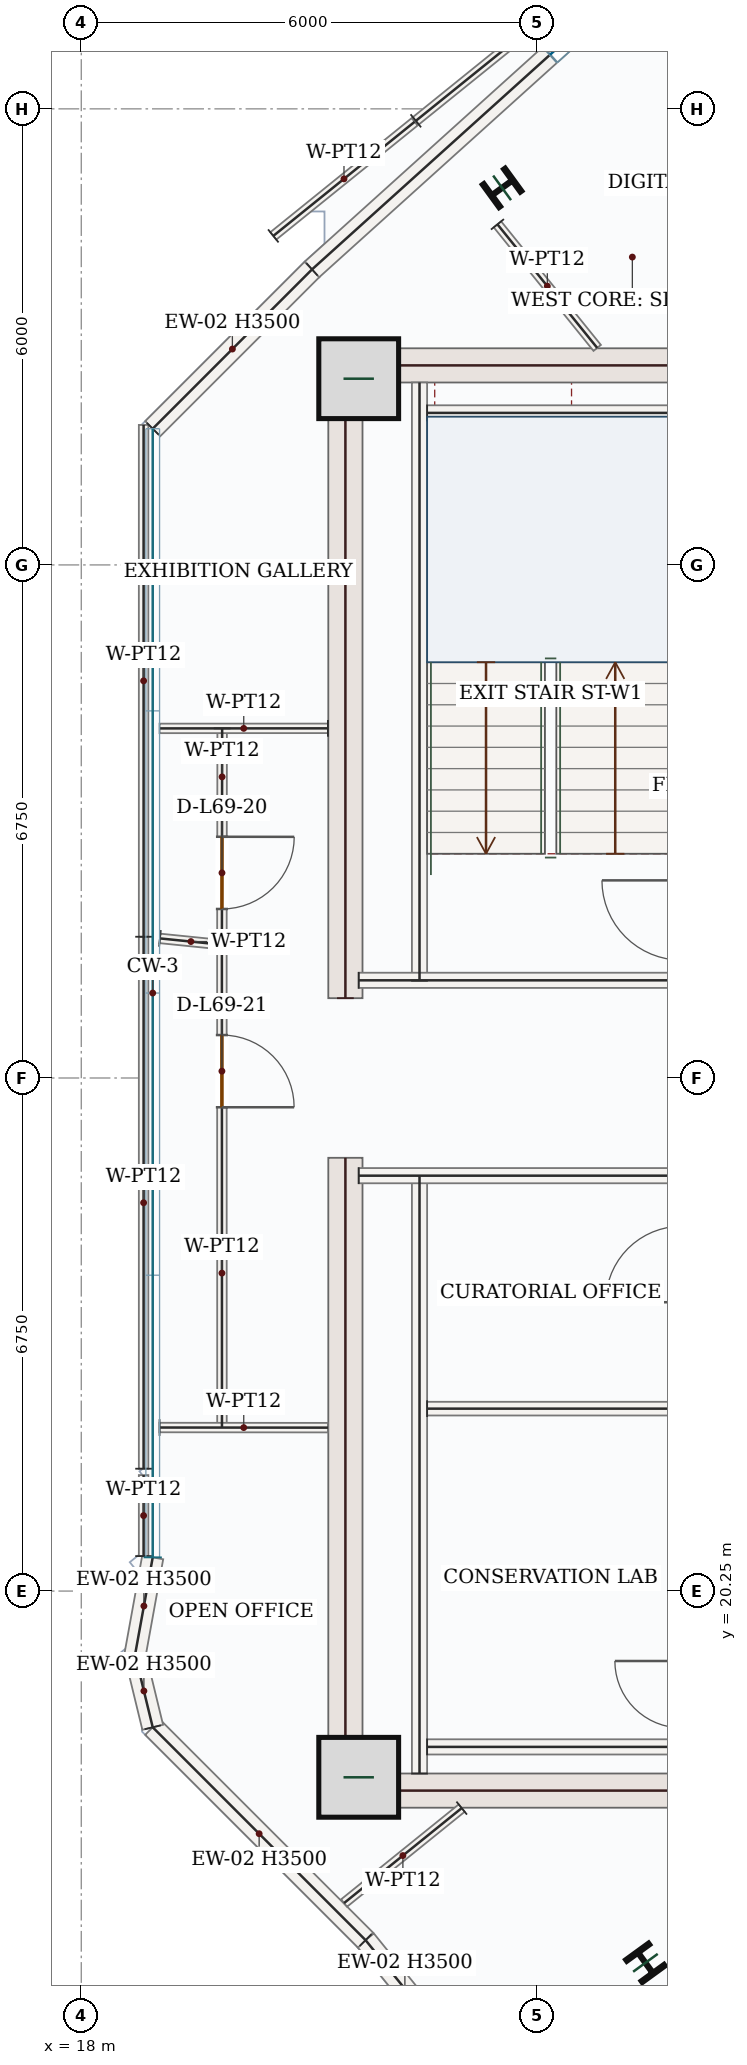
"""IFC4 building model, lengths in metres.
Left out: names, types, materials, properties, quantities, classifications, styles, units other than length and angle.
Written with IfcOpenShell. Run it as: python <this file> out.ifc"""

import sys

from ifc_helpers import new_model, si_unit, direction, frame, frame_2d, origin, origin_2d, place, context, subcontext, project, spatial, rectangle, i_section, extrude, source, transform, mapped, element, fill, save


model = new_model("IFC4")
c1 = context("Model", 3, precision=1e-05, world=origin(), true_north=direction((0.0, 1.0)))
c2 = subcontext(c1, "Body", "Model", "MODEL_VIEW")
j1 = project(units=[si_unit("LENGTHUNIT", "METRE"), si_unit("PLANEANGLEUNIT", "RADIAN")], contexts=[c1])
p1 = place(None, origin())
s1 = spatial("IfcSite", under=j1, at=p1, CompositionType="ELEMENT")
p2 = place(p1, origin())
s2 = spatial("IfcBuilding", under=s1, at=p2, CompositionType="ELEMENT")
p3 = place(p2, frame((0.0, 0.0, 287.85)))
s3 = spatial("IfcBuildingStorey", under=s2, at=p3, CompositionType="ELEMENT", Elevation=287.85)
m1 = source(origin(), c2, "Body", "SweptSolid", [
    extrude(rectangle(XDim=8.55, YDim=0.45, at=frame_2d((4.275, 0.0))), origin(), (0.0, 0.0, 1.0), 3.5),
])
for number, where, z_axis, x_axis in (
    (1, (21.475, 17.4, 0.0), (0.0, 0.0, 1.0), (0.0, 1.0, 0.0)),
    (2, (21.475, 28.05, 0.0), (0.0, 0.0, 1.0), (0.0, 1.0, 0.0)),
):
    element("IfcWall", number, at=place(p3, frame(where, z_axis=z_axis, x_axis=x_axis)), inside=s3, PredefinedType="SHEAR", context=c2, shape_type="MappedRepresentation", body=[
        mapped(m1, transform((0.0, 0.0, 0.0), x_axis=(1.0, 0.0, 0.0), y_axis=(0.0, 1.0, 0.0), z_axis=(0.0, 0.0, 1.0), scale=1.0)),
    ])
m2 = source(origin(), c2, "Body", "SweptSolid", [
    extrude(rectangle(XDim=7.1, YDim=0.45, at=frame_2d((3.55, 0.0))), origin(), (0.0, 0.0, 1.0), 3.5),
])
for number, where, z_axis, x_axis in (
    (3, (21.7, 17.625, 0.0), (0.0, 0.0, 1.0), (1.0, 0.0, 0.0)),
    (4, (21.7, 36.375, 0.0), (0.0, 0.0, 1.0), (1.0, 0.0, 0.0)),
):
    element("IfcWall", number, at=place(p3, frame(where, z_axis=z_axis, x_axis=x_axis)), inside=s3, PredefinedType="SHEAR", context=c2, shape_type="MappedRepresentation", body=[
        mapped(m2, transform((0.0, 0.0, 0.0), x_axis=(1.0, 0.0, 0.0), y_axis=(0.0, 1.0, 0.0), z_axis=(0.0, 0.0, 1.0), scale=1.0)),
    ])
m3 = source(origin(), c2, "Body", "SweptSolid", [
    extrude(rectangle(XDim=1.05, YDim=1.05, at=origin_2d()), origin(), (0.0, 0.0, 1.0), 3.75),
])
for number, where, z_axis, x_axis in (
    (5, (21.65, 17.8, 0.0), (0.0, 0.0, 1.0), (1.0, 0.0, 0.0)),
    (6, (21.65, 36.2, 0.0), (0.0, 0.0, 1.0), (1.0, 0.0, 0.0)),
):
    element("IfcColumn", number, at=place(p3, frame(where, z_axis=z_axis, x_axis=x_axis)), inside=s3, PredefinedType="COLUMN", context=c2, shape_type="MappedRepresentation", body=[
        mapped(m3, transform((0.0, 0.0, 0.0), x_axis=(1.0, 0.0, 0.0), y_axis=(0.0, 1.0, 0.0), z_axis=(0.0, 0.0, 1.0), scale=1.0)),
    ])
m4 = source(origin(), c2, "Body", "SweptSolid", [
    extrude(i_section(OverallWidth=0.374, OverallDepth=0.372, WebThickness=0.016, FlangeThickness=0.026, FilletRadius=0.018, at=origin_2d()), origin(), (0.0, 0.0, 1.0), 3.75),
])
for number, where, z_axis, x_axis in (
    (7, (23.536, 38.711, 0.0), (0.0, 0.0, 1.0), (-0.588, 0.809, 0.0)),
    (8, (25.422, 15.359, 0.0), (0.0, 0.0, 1.0), (0.809, 0.588, 0.0)),
):
    element("IfcColumn", number, at=place(p3, frame(where, z_axis=z_axis, x_axis=x_axis)), inside=s3, PredefinedType="COLUMN", context=c2, shape_type="MappedRepresentation", body=[
        mapped(m4, transform((0.0, 0.0, 0.0), x_axis=(1.0, 0.0, 0.0), y_axis=(0.0, 1.0, 0.0), z_axis=(0.0, 0.0, 1.0), scale=1.0)),
    ])
m5 = source(origin(), c2, "Body", "SweptSolid", [
    extrude(rectangle(XDim=2.964, YDim=0.28, at=frame_2d((1.482, 0.0))), origin(), (0.0, 0.0, 1.0), 3.5),
])
p4 = place(p3, frame((18.94, 35.542, 0.0), z_axis=(0.0, 0.0, 1.0), x_axis=(0.707106781187, 0.707106781187, 0.0)))
e9 = element("IfcWall", 9, at=p4, inside=s3, PredefinedType="SOLIDWALL", context=c2, shape_type="MappedRepresentation", body=[
    mapped(m5, transform((0.0, 0.0, 0.0), x_axis=(1.0, 0.0, 0.0), y_axis=(0.0, 1.0, 0.0), z_axis=(0.0, 0.0, 1.0), scale=1.0)),
])
p5 = place(p3, frame((21.036, 37.638, 0.0), z_axis=(0.0, 0.0, 1.0), x_axis=(0.742587457262, 0.669749108486, 0.0)))
e10 = element("IfcWall", 10, at=p5, inside=s3, PredefinedType="SOLIDWALL", context=c2, shape_type="SweptSolid", body=[
    extrude(rectangle(XDim=9.935, YDim=0.28, at=frame_2d((4.967, 0.0))), origin(), (0.0, 0.0, 1.0), 3.5),
])
p6 = place(p5, frame((4.217, 0.0, 0.85)))
e11 = element("IfcOpeningElement", 11, at=p6, cuts=e10, PredefinedType="OPENING", context=c2, shape_type="SweptSolid", body=[
    extrude(rectangle(XDim=1.5, YDim=1.5, at=frame_2d((0.75, 0.75))), frame((0.0, 0.15, 0.0), z_axis=(0.0, -1.0, 0.0), x_axis=(1.0, 0.0, 0.0)), (0.0, 0.0, 1.0), 0.3),
])
p7 = place(p3, frame((24.94, 11.695, 0.0), z_axis=(0.0, 0.0, 1.0), x_axis=(-0.628225517447, 0.778031297075, 0.0)))
e12 = element("IfcWall", 12, at=p7, inside=s3, PredefinedType="SOLIDWALL", context=c2, shape_type="SweptSolid", body=[
    extrude(rectangle(XDim=5.093, YDim=0.28, at=frame_2d((2.546, 0.0))), origin(), (0.0, 0.0, 1.0), 3.5),
])
p8 = place(p7, frame((1.796, 0.0, 0.85)))
e13 = element("IfcOpeningElement", 13, at=p8, cuts=e12, PredefinedType="OPENING", context=c2, shape_type="SweptSolid", body=[
    extrude(rectangle(XDim=1.5, YDim=1.5, at=frame_2d((0.75, 0.75))), frame((0.0, 0.15, 0.0), z_axis=(0.0, -1.0, 0.0), x_axis=(1.0, 0.0, 0.0)), (0.0, 0.0, 1.0), 0.3),
])
m6 = source(origin(), c2, "Body", "SweptSolid", [
    extrude(rectangle(XDim=3.96, YDim=0.28, at=frame_2d((1.98, 0.0))), origin(), (0.0, 0.0, 1.0), 3.5),
])
p9 = place(p3, frame((21.74, 15.658, 0.0), z_axis=(0.0, 0.0, 1.0), x_axis=(-0.707106781187, 0.707106781187, 0.0)))
e14 = element("IfcWall", 14, at=p9, inside=s3, PredefinedType="SOLIDWALL", context=c2, shape_type="MappedRepresentation", body=[
    mapped(m6, transform((0.0, 0.0, 0.0), x_axis=(1.0, 0.0, 0.0), y_axis=(0.0, 1.0, 0.0), z_axis=(0.0, 0.0, 1.0), scale=1.0)),
])
m7 = source(origin(), c2, "Body", "SweptSolid", [
    extrude(rectangle(XDim=0.983, YDim=0.28, at=frame_2d((0.492, 0.0))), origin(), (0.0, 0.0, 1.0), 3.5),
])
p10 = place(p3, frame((18.94, 18.458, 0.0), z_axis=(0.0, 0.0, 1.0), x_axis=(-0.235870049888, 0.971784605541, 0.0)))
e15 = element("IfcWall", 15, at=p10, inside=s3, PredefinedType="SOLIDWALL", context=c2, shape_type="MappedRepresentation", body=[
    mapped(m7, transform((0.0, 0.0, 0.0), x_axis=(1.0, 0.0, 0.0), y_axis=(0.0, 1.0, 0.0), z_axis=(0.0, 0.0, 1.0), scale=1.0)),
])
m8 = source(origin(), c2, "Body", "SweptSolid", [
    extrude(rectangle(XDim=1.301, YDim=0.28, at=frame_2d((0.65, 0.0))), origin(), (0.0, 0.0, 1.0), 3.5),
])
p11 = place(p3, frame((18.708, 19.414, 0.0), z_axis=(0.0, 0.0, 1.0), x_axis=(0.178323782993, 0.983971863632, 0.0)))
e16 = element("IfcWall", 16, at=p11, inside=s3, PredefinedType="SOLIDWALL", context=c2, shape_type="MappedRepresentation", body=[
    mapped(m8, transform((0.0, 0.0, 0.0), x_axis=(1.0, 0.0, 0.0), y_axis=(0.0, 1.0, 0.0), z_axis=(0.0, 0.0, 1.0), scale=1.0)),
])
m9 = source(origin(), c2, "Body", "SweptSolid", [
    extrude(rectangle(XDim=7.87, YDim=0.2, at=frame_2d((3.935, 0.0))), origin(), (0.0, 0.0, 1.0), 3.5),
])
for number, where, z_axis, x_axis in (
    (17, (22.45, 17.85, 0.0), (0.0, 0.0, 1.0), (0.0, 1.0, 0.0)),
    (18, (22.45, 28.28, 0.0), (0.0, 0.0, 1.0), (0.0, 1.0, 0.0)),
):
    element("IfcWall", number, at=place(p3, frame(where, z_axis=z_axis, x_axis=x_axis)), inside=s3, PredefinedType="SOLIDWALL", context=c2, shape_type="MappedRepresentation", body=[
        mapped(m9, transform((0.0, 0.0, 0.0), x_axis=(1.0, 0.0, 0.0), y_axis=(0.0, 1.0, 0.0), z_axis=(0.0, 0.0, 1.0), scale=1.0)),
    ])
m10 = source(origin(), c2, "Body", "SweptSolid", [
    extrude(rectangle(XDim=4.25, YDim=0.2, at=frame_2d((2.125, 0.0))), origin(), (0.0, 0.0, 1.0), 3.5),
])
for number, where, z_axis, x_axis in (
    (19, (21.65, 25.715, 0.0), (0.0, 0.0, 1.0), (1.0, 0.0, 0.0)),
    (20, (21.65, 28.285, 0.0), (0.0, 0.0, 1.0), (1.0, 0.0, 0.0)),
):
    element("IfcWall", number, at=place(p3, frame(where, z_axis=z_axis, x_axis=x_axis)), inside=s3, PredefinedType="SOLIDWALL", context=c2, shape_type="MappedRepresentation", body=[
        mapped(m10, transform((0.0, 0.0, 0.0), x_axis=(1.0, 0.0, 0.0), y_axis=(0.0, 1.0, 0.0), z_axis=(0.0, 0.0, 1.0), scale=1.0)),
    ])
m11 = source(origin(), c2, "Body", "SweptSolid", [
    extrude(rectangle(XDim=3.25, YDim=0.2, at=frame_2d((1.625, 0.0))), origin(), (0.0, 0.0, 1.0), 3.5),
])
for number, where, z_axis, x_axis in (
    (21, (22.55, 35.75, 0.0), (0.0, 0.0, 1.0), (1.0, 0.0, 0.0)),
    (22, (22.55, 18.2, 0.0), (0.0, 0.0, 1.0), (1.0, 0.0, 0.0)),
):
    element("IfcWall", number, at=place(p3, frame(where, z_axis=z_axis, x_axis=x_axis)), inside=s3, PredefinedType="SOLIDWALL", context=c2, shape_type="MappedRepresentation", body=[
        mapped(m11, transform((0.0, 0.0, 0.0), x_axis=(1.0, 0.0, 0.0), y_axis=(0.0, 1.0, 0.0), z_axis=(0.0, 0.0, 1.0), scale=1.0)),
    ])
m12 = source(origin(), c2, "Body", "SweptSolid", [
    extrude(rectangle(XDim=3.25, YDim=0.18, at=frame_2d((1.625, 0.0))), origin(), (0.0, 0.0, 1.0), 3.5),
])
p12 = place(p3, frame((22.55, 22.65, 0.0), z_axis=(0.0, 0.0, 1.0), x_axis=(1.0, 0.0, 0.0)))
e23 = element("IfcWall", 23, at=p12, inside=s3, PredefinedType="PARTITIONING", context=c2, shape_type="MappedRepresentation", body=[
    mapped(m12, transform((0.0, 0.0, 0.0), x_axis=(1.0, 0.0, 0.0), y_axis=(0.0, 1.0, 0.0), z_axis=(0.0, 0.0, 1.0), scale=1.0)),
])
p13 = place(p3, frame((19.85, 28.754, 0.0), z_axis=(0.0, 0.0, 1.0), x_axis=(0.000153721992, -0.999999988185, 0.0)))
e24 = element("IfcWall", 24, at=p13, inside=s3, PredefinedType="PARTITIONING", context=c2, shape_type="SweptSolid", body=[
    extrude(rectangle(XDim=6.353, YDim=0.125, at=frame_2d((3.176, 0.0))), origin(), (0.0, 0.0, 1.0), 3.5),
])
p14 = place(p13, frame((1.189, 0.0, 0.0)))
e25 = element("IfcOpeningElement", 25, at=p14, cuts=e24, PredefinedType="OPENING", context=c2, shape_type="SweptSolid", body=[
    extrude(rectangle(XDim=0.95, YDim=2.15, at=frame_2d((0.475, 1.075))), frame((0.0, 0.073, 0.0), z_axis=(0.0, -1.0, 0.0), x_axis=(1.0, 0.0, 0.0)), (0.0, 0.0, 1.0), 0.145),
])
m13 = source(origin(), c2, "Body", "SweptSolid", [
    extrude(rectangle(XDim=2.215, YDim=0.125, at=frame_2d((1.107, 0.0))), origin(), (0.0, 0.0, 1.0), 3.5),
])
p15 = place(p3, frame((19.03, 22.402, 0.0), z_axis=(0.0, 0.0, 1.0), x_axis=(0.999999702379, -0.000771519665, 0.0)))
e26 = element("IfcWall", 26, at=p15, inside=s3, PredefinedType="PARTITIONING", context=c2, shape_type="MappedRepresentation", body=[
    mapped(m13, transform((0.0, 0.0, 0.0), x_axis=(1.0, 0.0, 0.0), y_axis=(0.0, 1.0, 0.0), z_axis=(0.0, 0.0, 1.0), scale=1.0)),
])
m14 = source(origin(), c2, "Body", "SweptSolid", [
    extrude(rectangle(XDim=1.989, YDim=0.125, at=frame_2d((0.995, 0.0))), origin(), (0.0, 0.0, 1.0), 3.5),
])
p16 = place(p3, frame((23.005, 17.395, 0.0), z_axis=(0.0, 0.0, 1.0), x_axis=(-0.778058853423, -0.628191388519, 0.0)))
e27 = element("IfcWall", 27, at=p16, inside=s3, PredefinedType="PARTITIONING", context=c2, shape_type="MappedRepresentation", body=[
    mapped(m14, transform((0.0, 0.0, 0.0), x_axis=(1.0, 0.0, 0.0), y_axis=(0.0, 1.0, 0.0), z_axis=(0.0, 0.0, 1.0), scale=1.0)),
])
m15 = source(origin(), c2, "Body", "SweptSolid", [
    extrude(rectangle(XDim=1.066, YDim=0.125, at=frame_2d((0.533, 0.0))), origin(), (0.0, 0.0, 1.0), 3.5),
])
p17 = place(p3, frame((18.82, 20.71, 0.0), z_axis=(0.0, 0.0, 1.0), x_axis=(0.0, 1.0, 0.0)))
e28 = element("IfcWall", 28, at=p17, inside=s3, PredefinedType="PARTITIONING", context=c2, shape_type="MappedRepresentation", body=[
    mapped(m15, transform((0.0, 0.0, 0.0), x_axis=(1.0, 0.0, 0.0), y_axis=(0.0, 1.0, 0.0), z_axis=(0.0, 0.0, 1.0), scale=1.0)),
])
m16 = source(origin(), c2, "Body", "SweptSolid", [
    extrude(rectangle(XDim=6.999, YDim=0.125, at=frame_2d((3.499, 0.0))), origin(), (0.0, 0.0, 1.0), 3.5),
])
p18 = place(p3, frame((18.82, 21.86, 0.0), z_axis=(0.0, 0.0, 1.0), x_axis=(0.0, 1.0, 0.0)))
e29 = element("IfcWall", 29, at=p18, inside=s3, PredefinedType="PARTITIONING", context=c2, shape_type="MappedRepresentation", body=[
    mapped(m16, transform((0.0, 0.0, 0.0), x_axis=(1.0, 0.0, 0.0), y_axis=(0.0, 1.0, 0.0), z_axis=(0.0, 0.0, 1.0), scale=1.0)),
])
m17 = source(origin(), c2, "Body", "SweptSolid", [
    extrude(rectangle(XDim=0.819, YDim=0.125, at=frame_2d((0.41, 0.0))), origin(), (0.0, 0.0, 1.0), 3.5),
])
p19 = place(p3, frame((19.035, 28.836, 0.0), z_axis=(0.0, 0.0, 1.0), x_axis=(0.994885598115, -0.101008151471, 0.0)))
e30 = element("IfcWall", 30, at=p19, inside=s3, PredefinedType="PARTITIONING", context=c2, shape_type="MappedRepresentation", body=[
    mapped(m17, transform((0.0, 0.0, 0.0), x_axis=(1.0, 0.0, 0.0), y_axis=(0.0, 1.0, 0.0), z_axis=(0.0, 0.0, 1.0), scale=1.0)),
])
p20 = place(p3, frame((19.854, 31.6, 0.0), z_axis=(0.0, 0.0, 1.0), x_axis=(-0.00123022754, -0.99999924327, 0.0)))
e31 = element("IfcWall", 31, at=p20, inside=s3, PredefinedType="PARTITIONING", context=c2, shape_type="SweptSolid", body=[
    extrude(rectangle(XDim=2.778, YDim=0.125, at=frame_2d((1.389, 0.0))), origin(), (0.0, 0.0, 1.0), 3.5),
])
p21 = place(p20, frame((1.426, 0.0, 0.0)))
e32 = element("IfcOpeningElement", 32, at=p21, cuts=e31, PredefinedType="OPENING", context=c2, shape_type="SweptSolid", body=[
    extrude(rectangle(XDim=0.95, YDim=2.15, at=frame_2d((0.475, 1.075))), frame((0.0, 0.073, 0.0), z_axis=(0.0, -1.0, 0.0), x_axis=(1.0, 0.0, 0.0)), (0.0, 0.0, 1.0), 0.145),
])
m18 = source(origin(), c2, "Body", "SweptSolid", [
    extrude(rectangle(XDim=6.734, YDim=0.125, at=frame_2d((3.367, 0.0))), origin(), (0.0, 0.0, 1.0), 3.5),
])
p22 = place(p3, frame((18.82, 28.858, 0.0), z_axis=(0.0, 0.0, 1.0), x_axis=(0.0, 1.0, 0.0)))
e33 = element("IfcWall", 33, at=p22, inside=s3, PredefinedType="PARTITIONING", context=c2, shape_type="MappedRepresentation", body=[
    mapped(m18, transform((0.0, 0.0, 0.0), x_axis=(1.0, 0.0, 0.0), y_axis=(0.0, 1.0, 0.0), z_axis=(0.0, 0.0, 1.0), scale=1.0)),
])
m19 = source(origin(), c2, "Body", "SweptSolid", [
    extrude(rectangle(XDim=2.39, YDim=0.125, at=frame_2d((1.195, 0.0))), origin(), (0.0, 0.0, 1.0), 3.5),
])
p23 = place(p3, frame((20.527, 38.078, 0.0), z_axis=(0.0, 0.0, 1.0), x_axis=(0.778010315123, 0.628251501839, 0.0)))
e34 = element("IfcWall", 34, at=p23, inside=s3, PredefinedType="PARTITIONING", context=c2, shape_type="MappedRepresentation", body=[
    mapped(m19, transform((0.0, 0.0, 0.0), x_axis=(1.0, 0.0, 0.0), y_axis=(0.0, 1.0, 0.0), z_axis=(0.0, 0.0, 1.0), scale=1.0)),
])
m20 = source(origin(), c2, "Body", "SweptSolid", [
    extrude(rectangle(XDim=2.089, YDim=0.125, at=frame_2d((1.045, 0.0))), origin(), (0.0, 0.0, 1.0), 3.5),
])
p24 = place(p3, frame((23.475, 38.231, 0.0), z_axis=(0.0, 0.0, 1.0), x_axis=(0.628165745158, -0.778079556735, 0.0)))
e35 = element("IfcWall", 35, at=p24, inside=s3, PredefinedType="PARTITIONING", context=c2, shape_type="MappedRepresentation", body=[
    mapped(m20, transform((0.0, 0.0, 0.0), x_axis=(1.0, 0.0, 0.0), y_axis=(0.0, 1.0, 0.0), z_axis=(0.0, 0.0, 1.0), scale=1.0)),
])
p25 = place(p3, frame((21.245, 31.6, 0.0), z_axis=(0.0, 0.0, 1.0), x_axis=(-0.999999902817, -0.000440868468, 0.0)))
e36 = element("IfcWall", 36, at=p25, inside=s3, PredefinedType="PARTITIONING", context=c2, shape_type="MappedRepresentation", body=[
    mapped(m13, transform((0.0, 0.0, 0.0), x_axis=(1.0, 0.0, 0.0), y_axis=(0.0, 1.0, 0.0), z_axis=(0.0, 0.0, 1.0), scale=1.0)),
])
m21 = source(origin(), c2, "Body", "SweptSolid", [
    extrude(rectangle(XDim=4.72, YDim=0.125, at=frame_2d((2.36, 0.0))), origin(), (0.0, 0.0, 1.0), 3.5),
])
p26 = place(p3, frame((22.402, 39.592, 0.0), z_axis=(0.0, 0.0, 1.0), x_axis=(0.778024801452, 0.628233561922, 0.0)))
e37 = element("IfcWall", 37, at=p26, inside=s3, PredefinedType="PARTITIONING", context=c2, shape_type="MappedRepresentation", body=[
    mapped(m21, transform((0.0, 0.0, 0.0), x_axis=(1.0, 0.0, 0.0), y_axis=(0.0, 1.0, 0.0), z_axis=(0.0, 0.0, 1.0), scale=1.0)),
])
m22 = source(origin(), c2, "Body", "SweptSolid", [
    extrude(rectangle(XDim=1.5, YDim=1.5, at=frame_2d((0.75, 0.75))), frame((0.0, 0.03, 0.0), z_axis=(0.0, -1.0, 0.0), x_axis=(1.0, 0.0, 0.0)), (0.0, 0.0, 1.0), 0.06),
])
p27 = place(p6, origin())
e38 = element("IfcWindow", 38, at=p27, inside=s3, PartitioningType="SINGLE_PANEL", PredefinedType="WINDOW", context=c2, shape_type="MappedRepresentation", body=[
    mapped(m22, transform((0.0, 0.0, 0.0), x_axis=(1.0, 0.0, 0.0), y_axis=(0.0, 1.0, 0.0), z_axis=(0.0, 0.0, 1.0), scale=1.0)),
])
fill(e11, e38)
m23 = source(origin(), c2, "Body", "SweptSolid", [
    extrude(rectangle(XDim=0.95, YDim=2.15, at=frame_2d((0.475, 1.075))), frame((0.0, 0.025, 0.0), z_axis=(0.0, -1.0, 0.0), x_axis=(1.0, 0.0, 0.0)), (0.0, 0.0, 1.0), 0.05),
])
p28 = place(p21, origin())
e39 = element("IfcDoor", 39, at=p28, inside=s3, OperationType="SINGLE_SWING_LEFT", PredefinedType="DOOR", context=c2, shape_type="MappedRepresentation", body=[
    mapped(m23, transform((0.0, 0.0, 0.0), x_axis=(1.0, 0.0, 0.0), y_axis=(0.0, 1.0, 0.0), z_axis=(0.0, 0.0, 1.0), scale=1.0)),
])
fill(e32, e39)
p29 = place(p14, origin())
e40 = element("IfcDoor", 40, at=p29, inside=s3, OperationType="SINGLE_SWING_RIGHT", PredefinedType="DOOR", context=c2, shape_type="MappedRepresentation", body=[
    mapped(m23, transform((0.0, 0.0, 0.0), x_axis=(1.0, 0.0, 0.0), y_axis=(0.0, 1.0, 0.0), z_axis=(0.0, 0.0, 1.0), scale=1.0)),
])
fill(e25, e40)
save(model, sys.argv[1])
